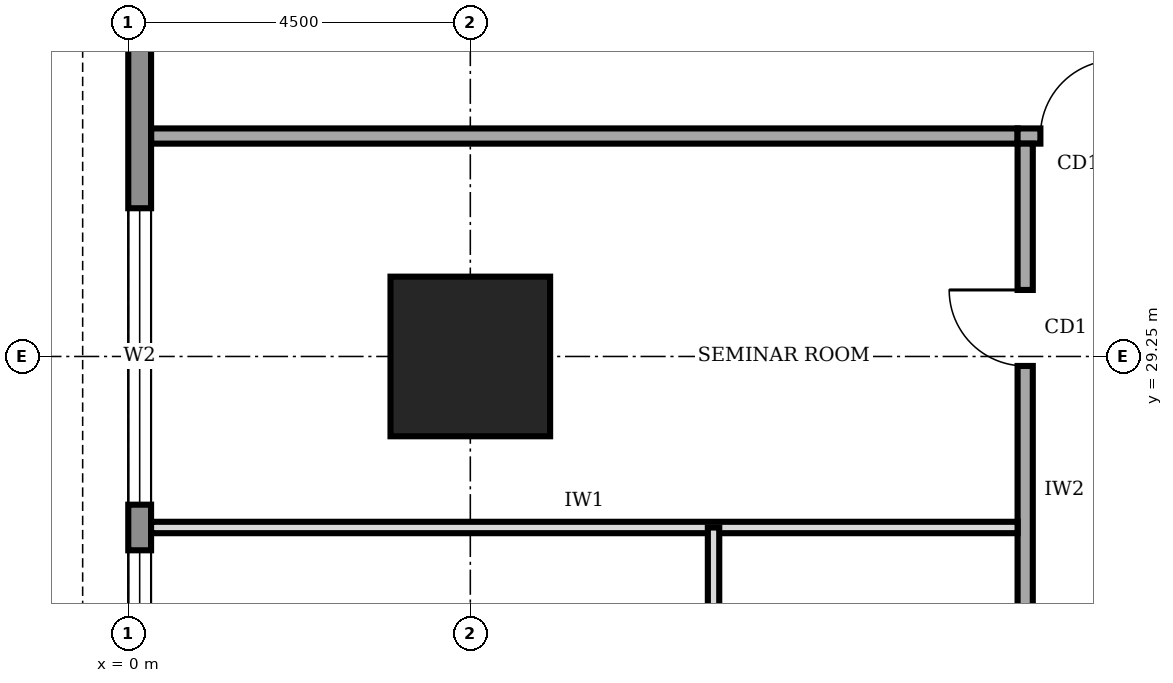
"""IFC4 building model, lengths in metres.
Left out: names, types, materials, properties, quantities, classifications, styles, units other than length and angle.
Written with IfcOpenShell. Run it as: python <this file> out.ifc"""

import sys

from ifc_helpers import new_model, si_unit, direction, frame, frame_2d, origin, origin_2d, place, context, subcontext, project, spatial, rectangle, extrude, element, fill, save


model = new_model("IFC4")
c1 = context("Model", 3, precision=1e-05, world=origin(), true_north=direction((0.0, 1.0)))
c2 = subcontext(c1, "Body", "Model", "MODEL_VIEW")
j1 = project(units=[si_unit("LENGTHUNIT", "METRE"), si_unit("PLANEANGLEUNIT", "RADIAN")], contexts=[c1])
p1 = place(None, origin())
s1 = spatial("IfcSite", under=j1, at=p1, CompositionType="ELEMENT")
p2 = place(p1, origin())
s2 = spatial("IfcBuilding", under=s1, at=p2, CompositionType="ELEMENT")
p3 = place(p2, frame((0.0, 0.0, 161.0)))
s3 = spatial("IfcBuildingStorey", under=s2, at=p3, CompositionType="ELEMENT", Elevation=161.0)
p4 = place(p3, frame((4.5, 29.25, 0.0), z_axis=(0.0, 0.0, 1.0), x_axis=(1.0, 0.0, 0.0)))
e1 = element("IfcColumn", 1, at=p4, inside=s3, PredefinedType="COLUMN", context=c2, shape_type="SweptSolid", body=[
    extrude(rectangle(XDim=2.1, YDim=2.1, at=origin_2d()), origin(), (0.0, 0.0, 1.0), 4.0),
])
p5 = place(p3, frame((0.15, 35.98, 0.0), z_axis=(0.0, 0.0, 1.0), x_axis=(0.0, -1.0, 0.0)))
e2 = element("IfcWall", 2, at=p5, inside=s3, PredefinedType="STANDARD", context=c2, shape_type="SweptSolid", body=[
    extrude(rectangle(XDim=31.46, YDim=0.3, at=frame_2d((15.73, 0.0))), origin(), (0.0, 0.0, 1.0), 3.75),
])
p6 = place(p5, frame((27.28, 0.0, 0.6)))
e3 = element("IfcOpeningElement", 3, at=p6, cuts=e2, PredefinedType="OPENING", context=c2, shape_type="SweptSolid", body=[
    extrude(rectangle(XDim=3.9, YDim=2.6, at=frame_2d((1.95, 1.3))), frame((0.0, 0.16, 0.0), z_axis=(0.0, -1.0, 0.0), x_axis=(1.0, 0.0, 0.0)), (0.0, 0.0, 1.0), 0.32),
])
p7 = place(p5, frame((22.78, 0.0, 0.6)))
e4 = element("IfcOpeningElement", 4, at=p7, cuts=e2, PredefinedType="OPENING", context=c2, shape_type="SweptSolid", body=[
    extrude(rectangle(XDim=3.9, YDim=2.6, at=frame_2d((1.95, 1.3))), frame((0.0, 0.16, 0.0), z_axis=(0.0, -1.0, 0.0), x_axis=(1.0, 0.0, 0.0)), (0.0, 0.0, 1.0), 0.32),
])
p8 = place(p5, frame((18.28, 0.0, 0.6)))
e5 = element("IfcOpeningElement", 5, at=p8, cuts=e2, PredefinedType="OPENING", context=c2, shape_type="SweptSolid", body=[
    extrude(rectangle(XDim=3.9, YDim=2.6, at=frame_2d((1.95, 1.3))), frame((0.0, 0.16, 0.0), z_axis=(0.0, -1.0, 0.0), x_axis=(1.0, 0.0, 0.0)), (0.0, 0.0, 1.0), 0.32),
])
p9 = place(p5, frame((13.78, 0.0, 0.6)))
e6 = element("IfcOpeningElement", 6, at=p9, cuts=e2, PredefinedType="OPENING", context=c2, shape_type="SweptSolid", body=[
    extrude(rectangle(XDim=3.9, YDim=2.6, at=frame_2d((1.95, 1.3))), frame((0.0, 0.16, 0.0), z_axis=(0.0, -1.0, 0.0), x_axis=(1.0, 0.0, 0.0)), (0.0, 0.0, 1.0), 0.32),
])
p10 = place(p5, frame((9.28, 0.0, 0.6)))
e7 = element("IfcOpeningElement", 7, at=p10, cuts=e2, PredefinedType="OPENING", context=c2, shape_type="SweptSolid", body=[
    extrude(rectangle(XDim=3.9, YDim=2.6, at=frame_2d((1.95, 1.3))), frame((0.0, 0.16, 0.0), z_axis=(0.0, -1.0, 0.0), x_axis=(1.0, 0.0, 0.0)), (0.0, 0.0, 1.0), 0.32),
])
p11 = place(p5, frame((4.78, 0.0, 0.6)))
e8 = element("IfcOpeningElement", 8, at=p11, cuts=e2, PredefinedType="OPENING", context=c2, shape_type="SweptSolid", body=[
    extrude(rectangle(XDim=3.9, YDim=2.6, at=frame_2d((1.95, 1.3))), frame((0.0, 0.16, 0.0), z_axis=(0.0, -1.0, 0.0), x_axis=(1.0, 0.0, 0.0)), (0.0, 0.0, 1.0), 0.32),
])
p12 = place(p3, frame((40.2, 32.15, 0.0), z_axis=(0.0, 0.0, 1.0), x_axis=(-1.0, 0.0, 0.0)))
e9 = element("IfcWall", 9, at=p12, inside=s3, PredefinedType="SOLIDWALL", context=c2, shape_type="SweptSolid", body=[
    extrude(rectangle(XDim=28.5, YDim=0.2, at=frame_2d((14.25, 0.0))), origin(), (0.0, 0.0, 1.0), 3.75),
])
p13 = place(p12, frame((27.2, 0.0, 0.0)))
e10 = element("IfcOpeningElement", 10, at=p13, cuts=e9, PredefinedType="OPENING", context=c2, shape_type="SweptSolid", body=[
    extrude(rectangle(XDim=1.0, YDim=2.1, at=frame_2d((0.5, 1.05))), frame((0.0, 0.11, 0.0), z_axis=(0.0, -1.0, 0.0), x_axis=(1.0, 0.0, 0.0)), (0.0, 0.0, 1.0), 0.22),
])
p14 = place(p12, frame((23.95, 0.0, 0.0)))
e11 = element("IfcOpeningElement", 11, at=p14, cuts=e9, PredefinedType="OPENING", context=c2, shape_type="SweptSolid", body=[
    extrude(rectangle(XDim=1.0, YDim=2.1, at=frame_2d((0.5, 1.05))), frame((0.0, 0.11, 0.0), z_axis=(0.0, -1.0, 0.0), x_axis=(1.0, 0.0, 0.0)), (0.0, 0.0, 1.0), 0.22),
])
p15 = place(p12, frame((17.2, 0.0, 0.0)))
e12 = element("IfcOpeningElement", 12, at=p15, cuts=e9, PredefinedType="OPENING", context=c2, shape_type="SweptSolid", body=[
    extrude(rectangle(XDim=1.0, YDim=2.1, at=frame_2d((0.5, 1.05))), frame((0.0, 0.11, 0.0), z_axis=(0.0, -1.0, 0.0), x_axis=(1.0, 0.0, 0.0)), (0.0, 0.0, 1.0), 0.22),
])
p16 = place(p12, frame((6.0, 0.0, 0.0)))
e13 = element("IfcOpeningElement", 13, at=p16, cuts=e9, PredefinedType="OPENING", context=c2, shape_type="SweptSolid", body=[
    extrude(rectangle(XDim=1.0, YDim=2.1, at=frame_2d((0.5, 1.05))), frame((0.0, 0.11, 0.0), z_axis=(0.0, -1.0, 0.0), x_axis=(1.0, 0.0, 0.0)), (0.0, 0.0, 1.0), 0.22),
])
p17 = place(p3, frame((11.8, 32.05, 0.0), z_axis=(0.0, 0.0, 1.0), x_axis=(0.0, -1.0, 0.0)))
e14 = element("IfcWall", 14, at=p17, inside=s3, PredefinedType="SOLIDWALL", context=c2, shape_type="SweptSolid", body=[
    extrude(rectangle(XDim=23.8, YDim=0.2, at=frame_2d((11.9, 0.0))), origin(), (0.0, 0.0, 1.0), 3.75),
])
p18 = place(p17, frame((20.675, 0.0, 0.0)))
e15 = element("IfcOpeningElement", 15, at=p18, cuts=e14, PredefinedType="OPENING", context=c2, shape_type="SweptSolid", body=[
    extrude(rectangle(XDim=1.0, YDim=2.1, at=frame_2d((0.5, 1.05))), frame((0.0, 0.11, 0.0), z_axis=(0.0, -1.0, 0.0), x_axis=(1.0, 0.0, 0.0)), (0.0, 0.0, 1.0), 0.22),
])
p19 = place(p17, frame((16.95, 0.0, 0.0)))
e16 = element("IfcOpeningElement", 16, at=p19, cuts=e14, PredefinedType="OPENING", context=c2, shape_type="SweptSolid", body=[
    extrude(rectangle(XDim=1.0, YDim=2.1, at=frame_2d((0.5, 1.05))), frame((0.0, 0.11, 0.0), z_axis=(0.0, -1.0, 0.0), x_axis=(1.0, 0.0, 0.0)), (0.0, 0.0, 1.0), 0.22),
])
p20 = place(p17, frame((13.95, 0.0, 0.0)))
e17 = element("IfcOpeningElement", 17, at=p20, cuts=e14, PredefinedType="OPENING", context=c2, shape_type="SweptSolid", body=[
    extrude(rectangle(XDim=0.9, YDim=2.1, at=frame_2d((0.45, 1.05))), frame((0.0, 0.11, 0.0), z_axis=(0.0, -1.0, 0.0), x_axis=(1.0, 0.0, 0.0)), (0.0, 0.0, 1.0), 0.22),
])
p21 = place(p17, frame((10.9, 0.0, 0.0)))
e18 = element("IfcOpeningElement", 18, at=p21, cuts=e14, PredefinedType="OPENING", context=c2, shape_type="SweptSolid", body=[
    extrude(rectangle(XDim=0.9, YDim=2.1, at=frame_2d((0.45, 1.05))), frame((0.0, 0.11, 0.0), z_axis=(0.0, -1.0, 0.0), x_axis=(1.0, 0.0, 0.0)), (0.0, 0.0, 1.0), 0.22),
])
p22 = place(p17, frame((6.2, 0.0, 0.0)))
e19 = element("IfcOpeningElement", 19, at=p22, cuts=e14, PredefinedType="OPENING", context=c2, shape_type="SweptSolid", body=[
    extrude(rectangle(XDim=0.9, YDim=2.1, at=frame_2d((0.45, 1.05))), frame((0.0, 0.11, 0.0), z_axis=(0.0, -1.0, 0.0), x_axis=(1.0, 0.0, 0.0)), (0.0, 0.0, 1.0), 0.22),
])
p23 = place(p17, frame((8.75, 0.0, 0.0)))
e20 = element("IfcOpeningElement", 20, at=p23, cuts=e14, PredefinedType="OPENING", context=c2, shape_type="SweptSolid", body=[
    extrude(rectangle(XDim=1.0, YDim=2.1, at=frame_2d((0.5, 1.05))), frame((0.0, 0.11, 0.0), z_axis=(0.0, -1.0, 0.0), x_axis=(1.0, 0.0, 0.0)), (0.0, 0.0, 1.0), 0.22),
])
p24 = place(p17, frame((1.925, 0.0, 0.0)))
e21 = element("IfcOpeningElement", 21, at=p24, cuts=e14, PredefinedType="OPENING", context=c2, shape_type="SweptSolid", body=[
    extrude(rectangle(XDim=1.0, YDim=2.1, at=frame_2d((0.5, 1.05))), frame((0.0, 0.11, 0.0), z_axis=(0.0, -1.0, 0.0), x_axis=(1.0, 0.0, 0.0)), (0.0, 0.0, 1.0), 0.22),
])
p25 = place(p3, frame((0.3, 32.15, 0.0), z_axis=(0.0, 0.0, 1.0), x_axis=(1.0, 0.0, 0.0)))
e22 = element("IfcWall", 22, at=p25, inside=s3, PredefinedType="SOLIDWALL", context=c2, shape_type="SweptSolid", body=[
    extrude(rectangle(XDim=11.4, YDim=0.2, at=frame_2d((5.7, 0.0))), origin(), (0.0, 0.0, 1.0), 3.75),
])
p26 = place(p3, frame((0.3, 27.0, 0.0), z_axis=(0.0, 0.0, 1.0), x_axis=(1.0, 0.0, 0.0)))
e23 = element("IfcWall", 23, at=p26, inside=s3, PredefinedType="PARTITIONING", context=c2, shape_type="SweptSolid", body=[
    extrude(rectangle(XDim=11.4, YDim=0.15, at=frame_2d((5.7, 0.0))), origin(), (0.0, 0.0, 1.0), 3.75),
])
p27 = place(p3, frame((7.7, 23.8, 0.0), z_axis=(0.0, 0.0, 1.0), x_axis=(0.0, 1.0, 0.0)))
e24 = element("IfcWall", 24, at=p27, inside=s3, PredefinedType="PARTITIONING", context=c2, shape_type="SweptSolid", body=[
    extrude(rectangle(XDim=3.2, YDim=0.15, at=frame_2d((1.6, 0.0))), origin(), (0.0, 0.0, 1.0), 3.75),
])
p28 = place(p10, origin())
e25 = element("IfcWindow", 25, at=p28, inside=s3, PartitioningType="SINGLE_PANEL", PredefinedType="WINDOW", context=c2, shape_type="SweptSolid", body=[
    extrude(rectangle(XDim=3.9, YDim=2.6, at=frame_2d((1.95, 1.3))), frame((0.0, 0.03, 0.0), z_axis=(0.0, -1.0, 0.0), x_axis=(1.0, 0.0, 0.0)), (0.0, 0.0, 1.0), 0.06),
])
fill(e7, e25)
p29 = place(p11, origin())
e26 = element("IfcWindow", 26, at=p29, inside=s3, PartitioningType="SINGLE_PANEL", PredefinedType="WINDOW", context=c2, shape_type="SweptSolid", body=[
    extrude(rectangle(XDim=3.9, YDim=2.6, at=frame_2d((1.95, 1.3))), frame((0.0, 0.03, 0.0), z_axis=(0.0, -1.0, 0.0), x_axis=(1.0, 0.0, 0.0)), (0.0, 0.0, 1.0), 0.06),
])
fill(e8, e26)
p30 = place(p13, frame((1.0, 0.0, 0.0), z_axis=(0.0, 0.0, 1.0), x_axis=(-1.0, 0.0, 0.0)))
e27 = element("IfcDoor", 27, at=p30, inside=s3, OperationType="SINGLE_SWING_RIGHT", PredefinedType="DOOR", context=c2, shape_type="SweptSolid", body=[
    extrude(rectangle(XDim=1.0, YDim=2.1, at=frame_2d((0.5, 1.05))), frame((0.0, 0.025, 0.0), z_axis=(0.0, -1.0, 0.0), x_axis=(1.0, 0.0, 0.0)), (0.0, 0.0, 1.0), 0.05),
])
fill(e10, e27)
p31 = place(p24, frame((1.0, 0.0, 0.0), z_axis=(0.0, 0.0, 1.0), x_axis=(-1.0, 0.0, 0.0)))
e28 = element("IfcDoor", 28, at=p31, inside=s3, OperationType="SINGLE_SWING_RIGHT", PredefinedType="DOOR", context=c2, shape_type="SweptSolid", body=[
    extrude(rectangle(XDim=1.0, YDim=2.1, at=frame_2d((0.5, 1.05))), frame((0.0, 0.025, 0.0), z_axis=(0.0, -1.0, 0.0), x_axis=(1.0, 0.0, 0.0)), (0.0, 0.0, 1.0), 0.05),
])
fill(e21, e28)
save(model, sys.argv[1])
